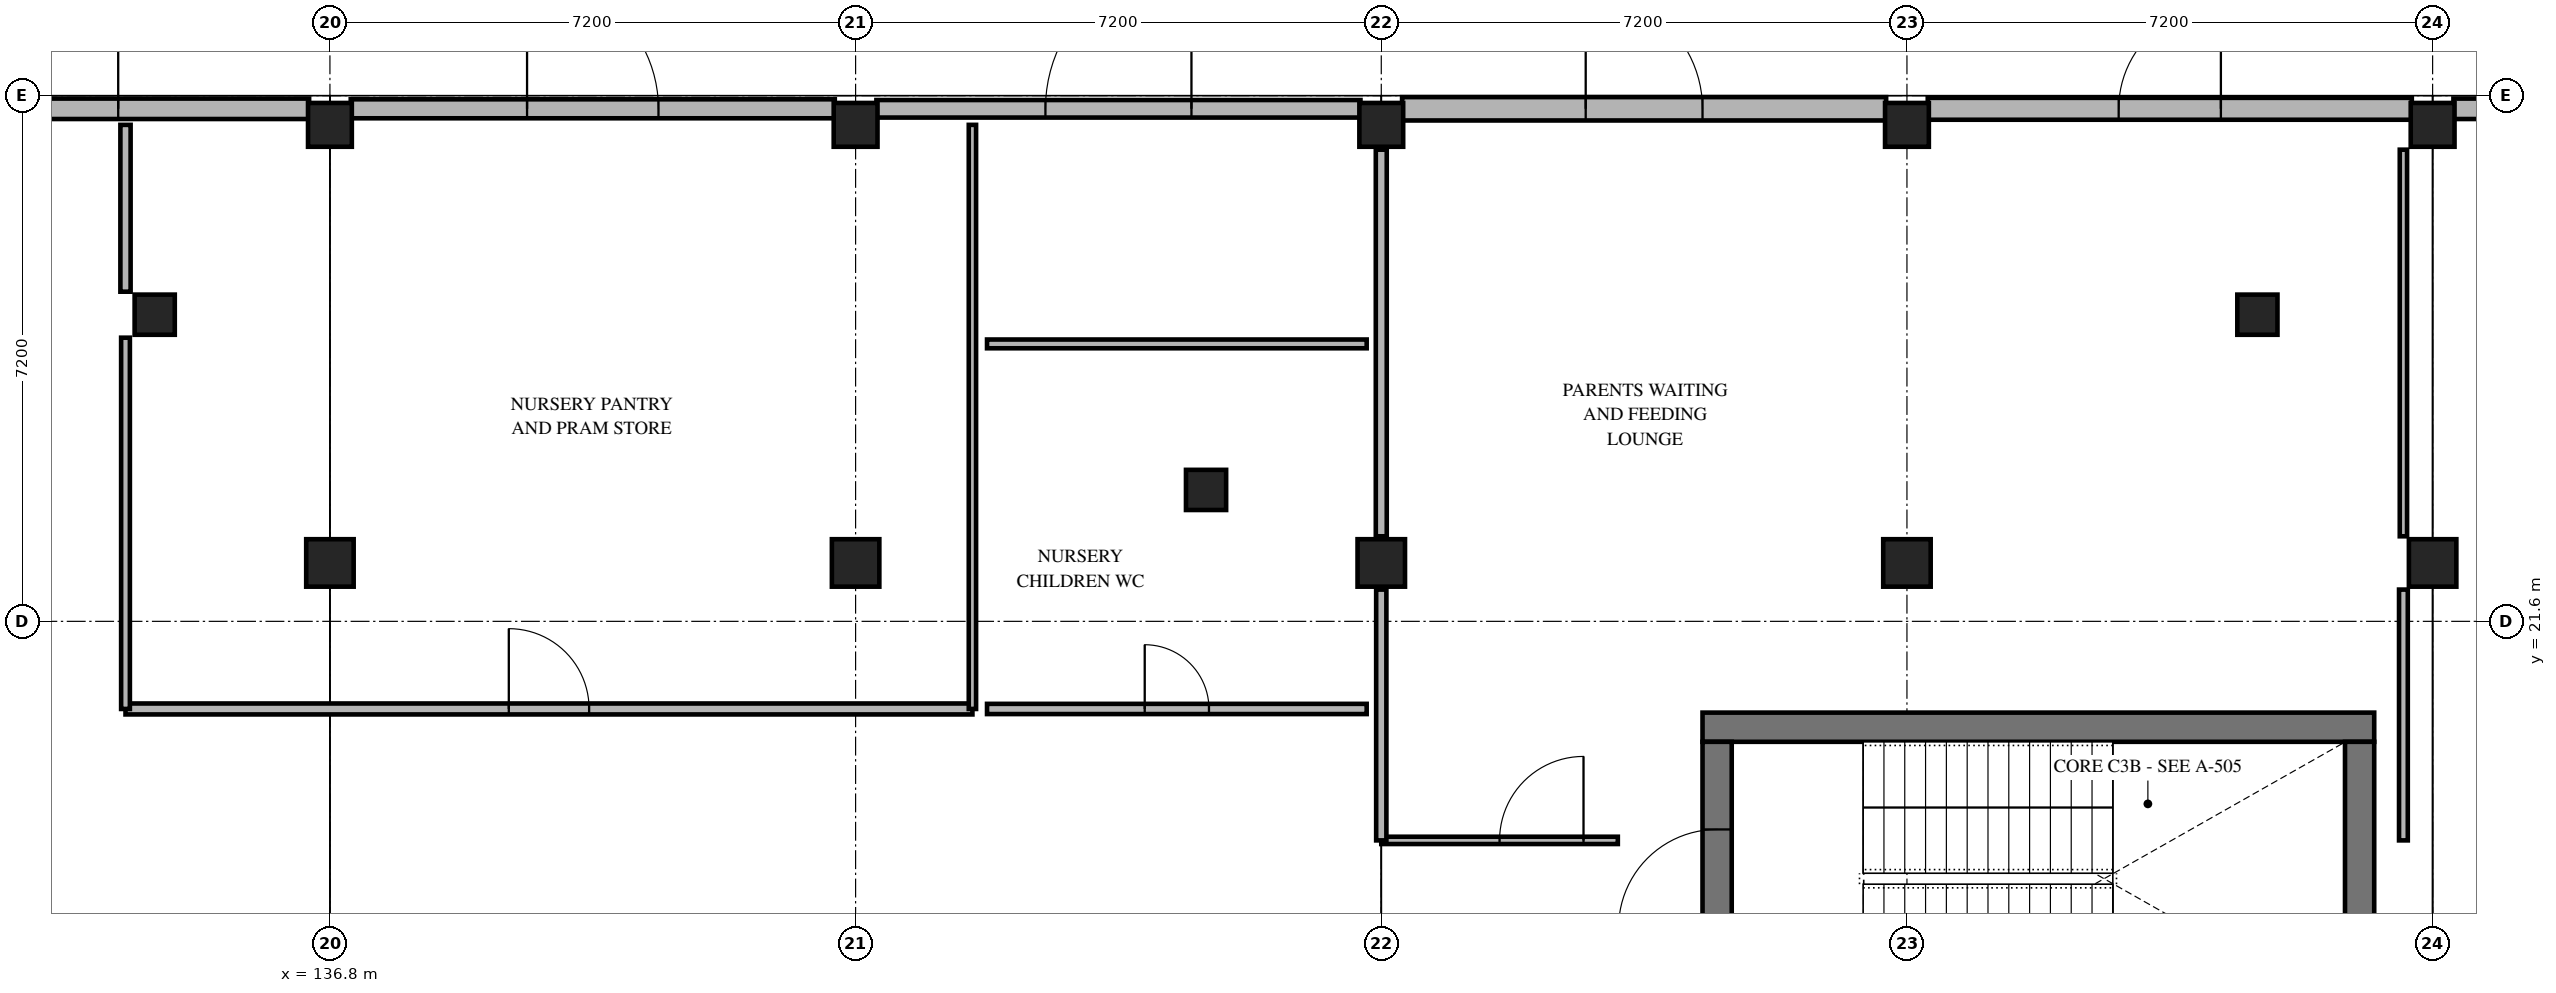
"""IFC4 building model, lengths in metres.
Left out: names, types, materials, properties, quantities, classifications, styles, units other than length and angle.
Written with IfcOpenShell. Run it as: python <this file> out.ifc"""

import sys

from ifc_helpers import new_model, si_unit, direction, frame, frame_2d, origin, origin_2d, place, context, subcontext, project, spatial, rectangle, extrude, element, fill, save


model = new_model("IFC4")
c1 = context("Model", 3, precision=1e-05, world=origin(), true_north=direction((0.0, 1.0)))
c2 = subcontext(c1, "Body", "Model", "MODEL_VIEW")
j1 = project(units=[si_unit("LENGTHUNIT", "METRE"), si_unit("PLANEANGLEUNIT", "RADIAN")], contexts=[c1])
p1 = place(None, origin())
s1 = spatial("IfcSite", under=j1, at=p1, CompositionType="ELEMENT")
p2 = place(p1, origin())
s2 = spatial("IfcBuilding", under=s1, at=p2, CompositionType="ELEMENT")
p3 = place(p2, origin())
s3 = spatial("IfcBuildingStorey", under=s2, at=p3, CompositionType="ELEMENT", Elevation=0.0)
p4 = place(p3, frame((136.8, 22.4, 0.0), z_axis=(0.0, 0.0, 1.0), x_axis=(1.0, 0.0, 0.0)))
e1 = element("IfcColumn", 1, at=p4, inside=s3, PredefinedType="COLUMN", context=c2, shape_type="SweptSolid", body=[
    extrude(rectangle(XDim=0.65, YDim=0.65, at=origin_2d()), origin(), (0.0, 0.0, 1.0), 4.5),
])
p5 = place(p3, frame((136.8, 28.4, 0.0), z_axis=(0.0, 0.0, 1.0), x_axis=(1.0, 0.0, 0.0)))
e2 = element("IfcColumn", 2, at=p5, inside=s3, PredefinedType="COLUMN", context=c2, shape_type="SweptSolid", body=[
    extrude(rectangle(XDim=0.6, YDim=0.6, at=origin_2d()), origin(), (0.0, 0.0, 1.0), 4.5),
])
p6 = place(p3, frame((144.0, 22.4, 0.0), z_axis=(0.0, 0.0, 1.0), x_axis=(1.0, 0.0, 0.0)))
e3 = element("IfcColumn", 3, at=p6, inside=s3, PredefinedType="COLUMN", context=c2, shape_type="SweptSolid", body=[
    extrude(rectangle(XDim=0.65, YDim=0.65, at=origin_2d()), origin(), (0.0, 0.0, 1.0), 4.5),
])
p7 = place(p3, frame((144.0, 28.4, 0.0), z_axis=(0.0, 0.0, 1.0), x_axis=(1.0, 0.0, 0.0)))
e4 = element("IfcColumn", 4, at=p7, inside=s3, PredefinedType="COLUMN", context=c2, shape_type="SweptSolid", body=[
    extrude(rectangle(XDim=0.6, YDim=0.6, at=origin_2d()), origin(), (0.0, 0.0, 1.0), 4.5),
])
p8 = place(p3, frame((151.2, 22.4, 0.0), z_axis=(0.0, 0.0, 1.0), x_axis=(1.0, 0.0, 0.0)))
e5 = element("IfcColumn", 5, at=p8, inside=s3, PredefinedType="COLUMN", context=c2, shape_type="SweptSolid", body=[
    extrude(rectangle(XDim=0.65, YDim=0.65, at=origin_2d()), origin(), (0.0, 0.0, 1.0), 4.5),
])
p9 = place(p3, frame((151.2, 28.4, 0.0), z_axis=(0.0, 0.0, 1.0), x_axis=(1.0, 0.0, 0.0)))
e6 = element("IfcColumn", 6, at=p9, inside=s3, PredefinedType="COLUMN", context=c2, shape_type="SweptSolid", body=[
    extrude(rectangle(XDim=0.6, YDim=0.6, at=origin_2d()), origin(), (0.0, 0.0, 1.0), 4.5),
])
p10 = place(p3, frame((158.4, 22.4, 0.0), z_axis=(0.0, 0.0, 1.0), x_axis=(1.0, 0.0, 0.0)))
e7 = element("IfcColumn", 7, at=p10, inside=s3, PredefinedType="COLUMN", context=c2, shape_type="SweptSolid", body=[
    extrude(rectangle(XDim=0.65, YDim=0.65, at=origin_2d()), origin(), (0.0, 0.0, 1.0), 4.5),
])
p11 = place(p3, frame((158.4, 28.4, 0.0), z_axis=(0.0, 0.0, 1.0), x_axis=(1.0, 0.0, 0.0)))
e8 = element("IfcColumn", 8, at=p11, inside=s3, PredefinedType="COLUMN", context=c2, shape_type="SweptSolid", body=[
    extrude(rectangle(XDim=0.6, YDim=0.6, at=origin_2d()), origin(), (0.0, 0.0, 1.0), 4.5),
])
p12 = place(p3, frame((165.6, 22.4, 0.0), z_axis=(0.0, 0.0, 1.0), x_axis=(1.0, 0.0, 0.0)))
e9 = element("IfcColumn", 9, at=p12, inside=s3, PredefinedType="COLUMN", context=c2, shape_type="SweptSolid", body=[
    extrude(rectangle(XDim=0.65, YDim=0.65, at=origin_2d()), origin(), (0.0, 0.0, 1.0), 4.5),
])
p13 = place(p3, frame((165.6, 28.4, 0.0), z_axis=(0.0, 0.0, 1.0), x_axis=(1.0, 0.0, 0.0)))
e10 = element("IfcColumn", 10, at=p13, inside=s3, PredefinedType="COLUMN", context=c2, shape_type="SweptSolid", body=[
    extrude(rectangle(XDim=0.6, YDim=0.6, at=origin_2d()), origin(), (0.0, 0.0, 1.0), 4.5),
])
for number, where, z_axis, x_axis in (
    (11, (134.4, 25.8, 0.0), (0.0, 0.0, 1.0), (1.0, 0.0, 0.0)),
    (12, (148.8, 23.4, 0.0), (0.0, 0.0, 1.0), (1.0, 0.0, 0.0)),
    (13, (163.2, 25.8, 0.0), (0.0, 0.0, 1.0), (1.0, 0.0, 0.0)),
):
    element("IfcColumn", number, at=place(p3, frame(where, z_axis=z_axis, x_axis=x_axis)), inside=s3, PredefinedType="COLUMN", context=c2, shape_type="SweptSolid", body=[
        extrude(rectangle(XDim=0.55, YDim=0.55, at=origin_2d()), origin(), (0.0, 0.0, 1.0), 4.5),
    ])
p14 = place(p3, frame((129.885, 28.62, 0.0), z_axis=(0.0, 0.0, 1.0), x_axis=(1.0, 0.0, 0.0)))
e14 = element("IfcWall", 14, at=p14, inside=s3, PredefinedType="SOLIDWALL", context=c2, shape_type="SweptSolid", body=[
    extrude(rectangle(XDim=6.63, YDim=0.28, at=frame_2d((3.315, 0.0))), origin(), (0.0, 0.0, 1.0), 3.64),
])
p15 = place(p14, frame((2.615, 0.0, 0.0)))
e15 = element("IfcOpeningElement", 15, at=p15, cuts=e14, PredefinedType="OPENING", context=c2, shape_type="SweptSolid", body=[
    extrude(rectangle(XDim=1.4, YDim=2.2, at=frame_2d((0.7, 1.1))), frame((0.0, 0.15, 0.0), z_axis=(0.0, -1.0, 0.0), x_axis=(1.0, 0.0, 0.0)), (0.0, 0.0, 1.0), 0.3),
])
p16 = place(p3, frame((137.085, 28.62, 0.0), z_axis=(0.0, 0.0, 1.0), x_axis=(1.0, 0.0, 0.0)))
e16 = element("IfcWall", 16, at=p16, inside=s3, PredefinedType="SOLIDWALL", context=c2, shape_type="SweptSolid", body=[
    extrude(rectangle(XDim=6.63, YDim=0.26, at=frame_2d((3.315, 0.0))), origin(), (0.0, 0.0, 1.0), 3.44),
])
p17 = place(p16, frame((2.415, 0.0, 0.0)))
e17 = element("IfcOpeningElement", 17, at=p17, cuts=e16, PredefinedType="OPENING", context=c2, shape_type="SweptSolid", body=[
    extrude(rectangle(XDim=1.8, YDim=2.4, at=frame_2d((0.9, 1.2))), frame((0.0, 0.14, 0.0), z_axis=(0.0, -1.0, 0.0), x_axis=(1.0, 0.0, 0.0)), (0.0, 0.0, 1.0), 0.28),
])
p18 = place(p3, frame((144.285, 28.62, 0.0), z_axis=(0.0, 0.0, 1.0), x_axis=(1.0, 0.0, 0.0)))
e18 = element("IfcWall", 18, at=p18, inside=s3, PredefinedType="SOLIDWALL", context=c2, shape_type="SweptSolid", body=[
    extrude(rectangle(XDim=6.63, YDim=0.24, at=frame_2d((3.315, 0.0))), origin(), (0.0, 0.0, 1.0), 3.49),
])
p19 = place(p18, frame((2.315, 0.0, 0.0)))
e19 = element("IfcOpeningElement", 19, at=p19, cuts=e18, PredefinedType="OPENING", context=c2, shape_type="SweptSolid", body=[
    extrude(rectangle(XDim=2.0, YDim=2.4, at=frame_2d((1.0, 1.2))), frame((0.0, 0.13, 0.0), z_axis=(0.0, -1.0, 0.0), x_axis=(1.0, 0.0, 0.0)), (0.0, 0.0, 1.0), 0.26),
])
p20 = place(p3, frame((151.485, 28.62, 0.0), z_axis=(0.0, 0.0, 1.0), x_axis=(1.0, 0.0, 0.0)))
e20 = element("IfcWall", 20, at=p20, inside=s3, PredefinedType="SOLIDWALL", context=c2, shape_type="SweptSolid", body=[
    extrude(rectangle(XDim=6.63, YDim=0.32, at=frame_2d((3.315, 0.0))), origin(), (0.0, 0.0, 1.0), 3.54),
])
p21 = place(p20, frame((2.515, 0.0, 0.0)))
e21 = element("IfcOpeningElement", 21, at=p21, cuts=e20, PredefinedType="OPENING", context=c2, shape_type="SweptSolid", body=[
    extrude(rectangle(XDim=1.6, YDim=2.3, at=frame_2d((0.8, 1.15))), frame((0.0, 0.17, 0.0), z_axis=(0.0, -1.0, 0.0), x_axis=(1.0, 0.0, 0.0)), (0.0, 0.0, 1.0), 0.34),
])
p22 = place(p3, frame((158.685, 28.62, 0.0), z_axis=(0.0, 0.0, 1.0), x_axis=(1.0, 0.0, 0.0)))
e22 = element("IfcWall", 22, at=p22, inside=s3, PredefinedType="SOLIDWALL", context=c2, shape_type="SweptSolid", body=[
    extrude(rectangle(XDim=6.63, YDim=0.3, at=frame_2d((3.315, 0.0))), origin(), (0.0, 0.0, 1.0), 3.59),
])
p23 = place(p22, frame((2.615, 0.0, 0.0)))
e23 = element("IfcOpeningElement", 23, at=p23, cuts=e22, PredefinedType="OPENING", context=c2, shape_type="SweptSolid", body=[
    extrude(rectangle(XDim=1.4, YDim=2.2, at=frame_2d((0.7, 1.1))), frame((0.0, 0.16, 0.0), z_axis=(0.0, -1.0, 0.0), x_axis=(1.0, 0.0, 0.0)), (0.0, 0.0, 1.0), 0.32),
])
p24 = place(p3, frame((165.885, 28.62, 0.0), z_axis=(0.0, 0.0, 1.0), x_axis=(1.0, 0.0, 0.0)))
e24 = element("IfcWall", 24, at=p24, inside=s3, PredefinedType="SOLIDWALL", context=c2, shape_type="SweptSolid", body=[
    extrude(rectangle(XDim=6.63, YDim=0.28, at=frame_2d((3.315, 0.0))), origin(), (0.0, 0.0, 1.0), 3.64),
])
p25 = place(p24, frame((2.865, 0.0, 0.9)))
e25 = element("IfcOpeningElement", 25, at=p25, cuts=e24, PredefinedType="OPENING", context=c2, shape_type="SweptSolid", body=[
    extrude(rectangle(XDim=0.9, YDim=1.2, at=frame_2d((0.45, 0.6))), frame((0.0, 0.15, 0.0), z_axis=(0.0, -1.0, 0.0), x_axis=(1.0, 0.0, 0.0)), (0.0, 0.0, 1.0), 0.3),
])
p26 = place(p3, frame((164.8, 20.15, 0.0), z_axis=(0.0, 0.0, 1.0), x_axis=(-1.0, 0.0, 0.0)))
e26 = element("IfcWall", 26, at=p26, inside=s3, PredefinedType="SHEAR", context=c2, shape_type="SweptSolid", body=[
    extrude(rectangle(XDim=9.2, YDim=0.4, at=frame_2d((4.6, 0.0))), origin(), (0.0, 0.0, 1.0), 4.24),
])
p27 = place(p3, frame((164.6, 16.2, 0.0), z_axis=(0.0, 0.0, 1.0), x_axis=(0.0, 1.0, 0.0)))
e27 = element("IfcWall", 27, at=p27, inside=s3, PredefinedType="SHEAR", context=c2, shape_type="SweptSolid", body=[
    extrude(rectangle(XDim=3.75, YDim=0.4, at=frame_2d((1.875, 0.0))), origin(), (0.0, 0.0, 1.0), 4.24),
])
p28 = place(p3, frame((155.8, 16.2, 0.0), z_axis=(0.0, 0.0, 1.0), x_axis=(0.0, 1.0, 0.0)))
e28 = element("IfcWall", 28, at=p28, inside=s3, PredefinedType="SHEAR", context=c2, shape_type="SweptSolid", body=[
    extrude(rectangle(XDim=3.75, YDim=0.4, at=frame_2d((1.875, 0.0))), origin(), (0.0, 0.0, 1.0), 4.24),
])
p29 = place(p28, frame((1.2, 0.0, 0.0)))
e29 = element("IfcOpeningElement", 29, at=p29, cuts=e28, PredefinedType="OPENING", context=c2, shape_type="SweptSolid", body=[
    extrude(rectangle(XDim=1.35, YDim=2.2, at=frame_2d((0.675, 1.1))), frame((0.0, 0.21, 0.0), z_axis=(0.0, -1.0, 0.0), x_axis=(1.0, 0.0, 0.0)), (0.0, 0.0, 1.0), 0.42),
])
p30 = place(p3, frame((151.2, 18.6, 0.0), z_axis=(0.0, 0.0, 1.0), x_axis=(1.0, 0.0, 0.0)))
e30 = element("IfcWall", 30, at=p30, inside=s3, PredefinedType="PARTITIONING", context=c2, shape_type="SweptSolid", body=[
    extrude(rectangle(XDim=3.24, YDim=0.1, at=frame_2d((1.62, 0.0))), origin(), (0.0, 0.0, 1.0), 3.59),
])
p31 = place(p30, frame((1.62, 0.0, 0.0)))
e31 = element("IfcOpeningElement", 31, at=p31, cuts=e30, PredefinedType="OPENING", context=c2, shape_type="SweptSolid", body=[
    extrude(rectangle(XDim=1.15, YDim=2.15, at=frame_2d((0.575, 1.075))), frame((0.0, 0.06, 0.0), z_axis=(0.0, -1.0, 0.0), x_axis=(1.0, 0.0, 0.0)), (0.0, 0.0, 1.0), 0.12),
])
p32 = place(p3, frame((151.2, 28.06, 0.0), z_axis=(0.0, 0.0, 1.0), x_axis=(0.0, -1.0, 0.0)))
e32 = element("IfcWall", 32, at=p32, inside=s3, PredefinedType="PARTITIONING", context=c2, shape_type="SweptSolid", body=[
    extrude(rectangle(XDim=5.295, YDim=0.15, at=frame_2d((2.647, 0.0))), origin(), (0.0, 0.0, 1.0), 3.64),
])
p33 = place(p3, frame((151.2, 22.035, 0.0), z_axis=(0.0, 0.0, 1.0), x_axis=(0.0, -1.0, 0.0)))
e33 = element("IfcWall", 33, at=p33, inside=s3, PredefinedType="PARTITIONING", context=c2, shape_type="SweptSolid", body=[
    extrude(rectangle(XDim=3.435, YDim=0.14, at=frame_2d((1.717, 0.0))), origin(), (0.0, 0.0, 1.0), 3.59),
])
p34 = place(p3, frame((165.2, 18.6, 0.0), z_axis=(0.0, 0.0, 1.0), x_axis=(0.0, 1.0, 0.0)))
e34 = element("IfcWall", 34, at=p34, inside=s3, PredefinedType="PARTITIONING", context=c2, shape_type="SweptSolid", body=[
    extrude(rectangle(XDim=3.435, YDim=0.12, at=frame_2d((1.717, 0.0))), origin(), (0.0, 0.0, 1.0), 4.24),
])
p35 = place(p3, frame((165.2, 22.765, 0.0), z_axis=(0.0, 0.0, 1.0), x_axis=(0.0, 1.0, 0.0)))
e35 = element("IfcWall", 35, at=p35, inside=s3, PredefinedType="PARTITIONING", context=c2, shape_type="SweptSolid", body=[
    extrude(rectangle(XDim=5.295, YDim=0.1, at=frame_2d((2.647, 0.0))), origin(), (0.0, 0.0, 1.0), 3.68),
])
p36 = place(p3, frame((134.0, 20.4, 0.0), z_axis=(0.0, 0.0, 1.0), x_axis=(1.0, 0.0, 0.0)))
e36 = element("IfcWall", 36, at=p36, inside=s3, PredefinedType="PARTITIONING", context=c2, shape_type="SweptSolid", body=[
    extrude(rectangle(XDim=11.6, YDim=0.15, at=frame_2d((5.8, 0.0))), origin(), (0.0, 0.0, 1.0), 3.49),
])
p37 = place(p36, frame((5.25, 0.0, 0.0)))
e37 = element("IfcOpeningElement", 37, at=p37, cuts=e36, PredefinedType="OPENING", context=c2, shape_type="SweptSolid", body=[
    extrude(rectangle(XDim=1.1, YDim=2.15, at=frame_2d((0.55, 1.075))), frame((0.0, 0.085, 0.0), z_axis=(0.0, -1.0, 0.0), x_axis=(1.0, 0.0, 0.0)), (0.0, 0.0, 1.0), 0.17),
])
p38 = place(p3, frame((134.0, 28.4, 0.0), z_axis=(0.0, 0.0, 1.0), x_axis=(0.0, -1.0, 0.0)))
e38 = element("IfcWall", 38, at=p38, inside=s3, PredefinedType="PARTITIONING", context=c2, shape_type="SweptSolid", body=[
    extrude(rectangle(XDim=2.285, YDim=0.14, at=frame_2d((1.143, 0.0))), origin(), (0.0, 0.0, 1.0), 3.64),
])
p39 = place(p3, frame((134.0, 25.485, 0.0), z_axis=(0.0, 0.0, 1.0), x_axis=(0.0, -1.0, 0.0)))
e39 = element("IfcWall", 39, at=p39, inside=s3, PredefinedType="PARTITIONING", context=c2, shape_type="SweptSolid", body=[
    extrude(rectangle(XDim=5.085, YDim=0.12, at=frame_2d((2.542, 0.0))), origin(), (0.0, 0.0, 1.0), 3.56),
])
p40 = place(p3, frame((145.6, 20.4, 0.0), z_axis=(0.0, 0.0, 1.0), x_axis=(0.0, 1.0, 0.0)))
e40 = element("IfcWall", 40, at=p40, inside=s3, PredefinedType="PARTITIONING", context=c2, shape_type="SweptSolid", body=[
    extrude(rectangle(XDim=8.0, YDim=0.1, at=frame_2d((4.0, 0.0))), origin(), (0.0, 0.0, 1.0), 3.49),
])
p41 = place(p3, frame((145.8, 20.4, 0.0), z_axis=(0.0, 0.0, 1.0), x_axis=(1.0, 0.0, 0.0)))
e41 = element("IfcWall", 41, at=p41, inside=s3, PredefinedType="PARTITIONING", context=c2, shape_type="SweptSolid", body=[
    extrude(rectangle(XDim=5.2, YDim=0.14, at=frame_2d((2.6, 0.0))), origin(), (0.0, 0.0, 1.0), 3.59),
])
p42 = place(p41, frame((2.16, 0.0, 0.0)))
e42 = element("IfcOpeningElement", 42, at=p42, cuts=e41, PredefinedType="OPENING", context=c2, shape_type="SweptSolid", body=[
    extrude(rectangle(XDim=0.88, YDim=2.1, at=frame_2d((0.44, 1.05))), frame((0.0, 0.08, 0.0), z_axis=(0.0, -1.0, 0.0), x_axis=(1.0, 0.0, 0.0)), (0.0, 0.0, 1.0), 0.16),
])
p43 = place(p3, frame((151.0, 25.4, 0.0), z_axis=(0.0, 0.0, 1.0), x_axis=(-1.0, 0.0, 0.0)))
e43 = element("IfcWall", 43, at=p43, inside=s3, PredefinedType="PARTITIONING", context=c2, shape_type="SweptSolid", body=[
    extrude(rectangle(XDim=5.2, YDim=0.12, at=frame_2d((2.6, 0.0))), origin(), (0.0, 0.0, 1.0), 3.52),
])
p44 = place(p15, origin())
e44 = element("IfcDoor", 44, at=p44, inside=s3, OperationType="SINGLE_SWING_RIGHT", PredefinedType="DOOR", context=c2, shape_type="SweptSolid", body=[
    extrude(rectangle(XDim=1.4, YDim=2.2, at=frame_2d((0.7, 1.1))), frame((0.0, 0.025, 0.0), z_axis=(0.0, -1.0, 0.0), x_axis=(1.0, 0.0, 0.0)), (0.0, 0.0, 1.0), 0.05),
])
fill(e15, e44)
p45 = place(p17, origin())
e45 = element("IfcDoor", 45, at=p45, inside=s3, OperationType="SINGLE_SWING_LEFT", PredefinedType="DOOR", context=c2, shape_type="SweptSolid", body=[
    extrude(rectangle(XDim=1.8, YDim=2.4, at=frame_2d((0.9, 1.2))), frame((0.0, 0.025, 0.0), z_axis=(0.0, -1.0, 0.0), x_axis=(1.0, 0.0, 0.0)), (0.0, 0.0, 1.0), 0.05),
])
fill(e17, e45)
p46 = place(p19, origin())
e46 = element("IfcDoor", 46, at=p46, inside=s3, OperationType="SINGLE_SWING_RIGHT", PredefinedType="DOOR", context=c2, shape_type="SweptSolid", body=[
    extrude(rectangle(XDim=2.0, YDim=2.4, at=frame_2d((1.0, 1.2))), frame((0.0, 0.025, 0.0), z_axis=(0.0, -1.0, 0.0), x_axis=(1.0, 0.0, 0.0)), (0.0, 0.0, 1.0), 0.05),
])
fill(e19, e46)
p47 = place(p21, origin())
e47 = element("IfcDoor", 47, at=p47, inside=s3, OperationType="SINGLE_SWING_LEFT", PredefinedType="DOOR", context=c2, shape_type="SweptSolid", body=[
    extrude(rectangle(XDim=1.6, YDim=2.3, at=frame_2d((0.8, 1.15))), frame((0.0, 0.025, 0.0), z_axis=(0.0, -1.0, 0.0), x_axis=(1.0, 0.0, 0.0)), (0.0, 0.0, 1.0), 0.05),
])
fill(e21, e47)
p48 = place(p23, origin())
e48 = element("IfcDoor", 48, at=p48, inside=s3, OperationType="SINGLE_SWING_RIGHT", PredefinedType="DOOR", context=c2, shape_type="SweptSolid", body=[
    extrude(rectangle(XDim=1.4, YDim=2.2, at=frame_2d((0.7, 1.1))), frame((0.0, 0.025, 0.0), z_axis=(0.0, -1.0, 0.0), x_axis=(1.0, 0.0, 0.0)), (0.0, 0.0, 1.0), 0.05),
])
fill(e23, e48)
p49 = place(p29, origin())
e49 = element("IfcDoor", 49, at=p49, inside=s3, OperationType="SINGLE_SWING_LEFT", PredefinedType="DOOR", context=c2, shape_type="SweptSolid", body=[
    extrude(rectangle(XDim=1.35, YDim=2.2, at=frame_2d((0.675, 1.1))), frame((0.0, 0.025, 0.0), z_axis=(0.0, -1.0, 0.0), x_axis=(1.0, 0.0, 0.0)), (0.0, 0.0, 1.0), 0.05),
])
fill(e29, e49)
p50 = place(p31, origin())
e50 = element("IfcDoor", 50, at=p50, inside=s3, OperationType="SINGLE_SWING_RIGHT", PredefinedType="DOOR", context=c2, shape_type="SweptSolid", body=[
    extrude(rectangle(XDim=1.15, YDim=2.15, at=frame_2d((0.575, 1.075))), frame((0.0, 0.025, 0.0), z_axis=(0.0, -1.0, 0.0), x_axis=(1.0, 0.0, 0.0)), (0.0, 0.0, 1.0), 0.05),
])
fill(e31, e50)
p51 = place(p37, origin())
e51 = element("IfcDoor", 51, at=p51, inside=s3, OperationType="SINGLE_SWING_LEFT", PredefinedType="DOOR", context=c2, shape_type="SweptSolid", body=[
    extrude(rectangle(XDim=1.1, YDim=2.15, at=frame_2d((0.55, 1.075))), frame((0.0, 0.025, 0.0), z_axis=(0.0, -1.0, 0.0), x_axis=(1.0, 0.0, 0.0)), (0.0, 0.0, 1.0), 0.05),
])
fill(e37, e51)
p52 = place(p42, origin())
e52 = element("IfcDoor", 52, at=p52, inside=s3, OperationType="SINGLE_SWING_LEFT", PredefinedType="DOOR", context=c2, shape_type="SweptSolid", body=[
    extrude(rectangle(XDim=0.88, YDim=2.1, at=frame_2d((0.44, 1.05))), frame((0.0, 0.025, 0.0), z_axis=(0.0, -1.0, 0.0), x_axis=(1.0, 0.0, 0.0)), (0.0, 0.0, 1.0), 0.05),
])
fill(e42, e52)
save(model, sys.argv[1])
